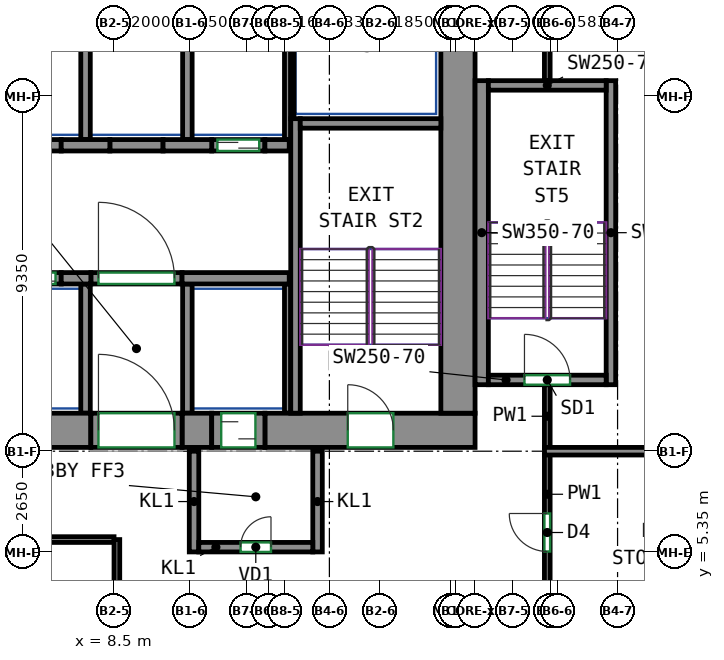
"""IFC4 building model, lengths in metres.
Left out: names, types, materials, properties, quantities, classifications, styles, units other than length and angle.
Written with IfcOpenShell. Run it as: python <this file> out.ifc"""

import sys

from ifc_helpers import new_model, si_unit, direction, frame, frame_2d, origin, place, context, subcontext, project, spatial, rectangle, extrude, source, transform, mapped, element, fill, save


model = new_model("IFC4")
c1 = context("Model", 3, precision=1e-05, world=origin(), true_north=direction((0.0, 1.0)))
c2 = subcontext(c1, "Body", "Model", "MODEL_VIEW")
j1 = project(units=[si_unit("LENGTHUNIT", "METRE"), si_unit("PLANEANGLEUNIT", "RADIAN")], contexts=[c1])
p1 = place(None, origin())
s1 = spatial("IfcSite", under=j1, at=p1, CompositionType="ELEMENT")
p2 = place(p1, origin())
s2 = spatial("IfcBuilding", under=s1, at=p2, CompositionType="ELEMENT")
p3 = place(p2, frame((0.0, 0.0, 147.3)))
s3 = spatial("IfcBuildingStorey", under=s2, at=p3, CompositionType="ELEMENT", Elevation=147.3)
m1 = source(origin(), c2, "Body", "SweptSolid", [
    extrude(rectangle(XDim=14.18, YDim=0.9, at=frame_2d((7.09, 0.0))), origin(), (0.0, 0.0, 1.0), 3.12),
])
p4 = place(p3, frame((-6.29, 8.55, 0.0), z_axis=(0.0, 0.0, 1.0), x_axis=(1.0, 0.0, 0.0)))
e1 = element("IfcWall", 1, at=p4, inside=s3, PredefinedType="SHEAR", context=c2, shape_type="MappedRepresentation", body=[
    mapped(m1, transform((0.0, 0.0, 0.0))),
])
m2 = source(origin(), c2, "Body", "SweptSolid", [
    extrude(rectangle(XDim=0.78, YDim=0.9, at=frame_2d((0.39, 0.0))), origin(), (0.0, 0.0, 1.0), 3.12),
])
p5 = place(p3, frame((10.29, 8.55, 0.0), z_axis=(0.0, 0.0, 1.0), x_axis=(1.0, 0.0, 0.0)))
e2 = element("IfcWall", 2, at=p5, inside=s3, PredefinedType="SHEAR", context=c2, shape_type="MappedRepresentation", body=[
    mapped(m2, transform((0.0, 0.0, 0.0))),
])
m3 = source(origin(), c2, "Body", "SweptSolid", [
    extrude(rectangle(XDim=5.53, YDim=0.9, at=frame_2d((2.765, 0.0))), origin(), (0.0, 0.0, 1.0), 3.12),
])
p6 = place(p3, frame((12.47, 8.55, 0.0), z_axis=(0.0, 0.0, 1.0), x_axis=(1.0, 0.0, 0.0)))
e3 = element("IfcWall", 3, at=p6, inside=s3, PredefinedType="SHEAR", context=c2, shape_type="MappedRepresentation", body=[
    mapped(m3, transform((0.0, 0.0, 0.0))),
])
p7 = place(p6, frame((2.18, 0.0, 0.0)))
e4 = element("IfcOpeningElement", 4, at=p7, cuts=e3, PredefinedType="OPENING", context=c2, shape_type="SweptSolid", body=[
    extrude(rectangle(XDim=1.2, YDim=2.1, at=frame_2d((0.6, 1.05))), frame((0.0, 0.46, 0.0), z_axis=(0.0, -1.0, 0.0), x_axis=(1.0, 0.0, 0.0)), (0.0, 0.0, 1.0), 0.92),
])
m4 = source(origin(), c2, "Body", "SweptSolid", [
    extrude(rectangle(XDim=12.0, YDim=0.9, at=frame_2d((6.0, 0.0))), origin(), (0.0, 0.0, 1.0), 3.12),
])
p8 = place(p3, frame((17.55, 9.0, 0.0), z_axis=(0.0, 0.0, 1.0), x_axis=(0.0, 1.0, 0.0)))
e5 = element("IfcWall", 5, at=p8, inside=s3, PredefinedType="SHEAR", context=c2, shape_type="MappedRepresentation", body=[
    mapped(m4, transform((0.0, 0.0, 0.0))),
])
m5 = source(origin(), c2, "Body", "SweptSolid", [
    extrude(rectangle(XDim=7.75, YDim=0.25, at=frame_2d((3.875, 0.0))), origin(), (0.0, 0.0, 1.0), 3.12),
])
p9 = place(p3, frame((13.275, 9.0, 0.0), z_axis=(0.0, 0.0, 1.0), x_axis=(0.0, 1.0, 0.0)))
e6 = element("IfcWall", 6, at=p9, inside=s3, PredefinedType="SHEAR", context=c2, shape_type="MappedRepresentation", body=[
    mapped(m5, transform((0.0, 0.0, 0.0))),
])
m6 = source(origin(), c2, "Body", "SweptSolid", [
    extrude(rectangle(XDim=3.7, YDim=0.25, at=frame_2d((1.85, 0.0))), origin(), (0.0, 0.0, 1.0), 3.12),
])
p10 = place(p3, frame((13.4, 16.625, 0.0), z_axis=(0.0, 0.0, 1.0), x_axis=(1.0, 0.0, 0.0)))
e7 = element("IfcWall", 7, at=p10, inside=s3, PredefinedType="SHEAR", context=c2, shape_type="MappedRepresentation", body=[
    mapped(m6, transform((0.0, 0.0, 0.0))),
])
m7 = source(origin(), c2, "Body", "SweptSolid", [
    extrude(rectangle(XDim=8.0, YDim=0.35, at=frame_2d((4.0, 0.0))), origin(), (0.0, 0.0, 1.0), 3.12),
])
p11 = place(p3, frame((18.175, 9.75, 0.0), z_axis=(0.0, 0.0, 1.0), x_axis=(0.0, 1.0, 0.0)))
e8 = element("IfcWall", 8, at=p11, inside=s3, PredefinedType="SHEAR", context=c2, shape_type="MappedRepresentation", body=[
    mapped(m7, transform((0.0, 0.0, 0.0))),
])
m8 = source(origin(), c2, "Body", "SweptSolid", [
    extrude(rectangle(XDim=8.0, YDim=0.25, at=frame_2d((4.0, 0.0))), origin(), (0.0, 0.0, 1.0), 3.12),
])
p12 = place(p3, frame((21.575, 9.75, 0.0), z_axis=(0.0, 0.0, 1.0), x_axis=(0.0, 1.0, 0.0)))
e9 = element("IfcWall", 9, at=p12, inside=s3, PredefinedType="SHEAR", context=c2, shape_type="MappedRepresentation", body=[
    mapped(m8, transform((0.0, 0.0, 0.0))),
])
m9 = source(origin(), c2, "Body", "SweptSolid", [
    extrude(rectangle(XDim=3.1, YDim=0.25, at=frame_2d((1.55, 0.0))), origin(), (0.0, 0.0, 1.0), 3.12),
])
p13 = place(p3, frame((18.35, 9.875, 0.0), z_axis=(0.0, 0.0, 1.0), x_axis=(1.0, 0.0, 0.0)))
e10 = element("IfcWall", 10, at=p13, inside=s3, PredefinedType="SHEAR", context=c2, shape_type="MappedRepresentation", body=[
    mapped(m9, transform((0.0, 0.0, 0.0))),
])
p14 = place(p13, frame((0.95, 0.0, 0.0)))
e11 = element("IfcOpeningElement", 11, at=p14, cuts=e10, PredefinedType="OPENING", context=c2, shape_type="SweptSolid", body=[
    extrude(rectangle(XDim=1.2, YDim=2.1, at=frame_2d((0.6, 1.05))), frame((0.0, 0.135, 0.0), z_axis=(0.0, -1.0, 0.0), x_axis=(1.0, 0.0, 0.0)), (0.0, 0.0, 1.0), 0.27),
])
p15 = place(p3, frame((18.35, 17.625, 0.0), z_axis=(0.0, 0.0, 1.0), x_axis=(1.0, 0.0, 0.0)))
e12 = element("IfcWall", 12, at=p15, inside=s3, PredefinedType="SHEAR", context=c2, shape_type="MappedRepresentation", body=[
    mapped(m9, transform((0.0, 0.0, 0.0))),
])
m10 = source(origin(), c2, "Body", "SweptSolid", [
    extrude(rectangle(XDim=0.78, YDim=0.3, at=frame_2d((0.39, 0.0))), origin(), (0.0, 0.0, 1.0), 3.12),
])
p16 = place(p3, frame((7.11, 12.55, 0.0), z_axis=(0.0, 0.0, 1.0), x_axis=(1.0, 0.0, 0.0)))
e13 = element("IfcWall", 13, at=p16, inside=s3, PredefinedType="SHEAR", context=c2, shape_type="MappedRepresentation", body=[
    mapped(m10, transform((0.0, 0.0, 0.0))),
])
m11 = source(origin(), c2, "Body", "SweptSolid", [
    extrude(rectangle(XDim=2.82, YDim=0.3, at=frame_2d((1.41, 0.0))), origin(), (0.0, 0.0, 1.0), 3.12),
])
p17 = place(p3, frame((10.29, 12.55, 0.0), z_axis=(0.0, 0.0, 1.0), x_axis=(1.0, 0.0, 0.0)))
e14 = element("IfcWall", 14, at=p17, inside=s3, PredefinedType="SHEAR", context=c2, shape_type="MappedRepresentation", body=[
    mapped(m11, transform((0.0, 0.0, 0.0))),
])
m12 = source(origin(), c2, "Body", "SweptSolid", [
    extrude(rectangle(XDim=1.28, YDim=0.3, at=frame_2d((0.64, 0.0))), origin(), (0.0, 0.0, 1.0), 3.12),
])
p18 = place(p3, frame((7.11, 16.05, 0.0), z_axis=(0.0, 0.0, 1.0), x_axis=(1.0, 0.0, 0.0)))
e15 = element("IfcWall", 15, at=p18, inside=s3, PredefinedType="SHEAR", context=c2, shape_type="MappedRepresentation", body=[
    mapped(m12, transform((0.0, 0.0, 0.0))),
])
m13 = source(origin(), c2, "Body", "SweptSolid", [
    extrude(rectangle(XDim=1.28, YDim=0.3, at=frame_2d((0.64, 0.0))), origin(), (0.0, 0.0, 1.0), 3.12),
])
p19 = place(p3, frame((9.79, 16.05, 0.0), z_axis=(0.0, 0.0, 1.0), x_axis=(1.0, 0.0, 0.0)))
e16 = element("IfcWall", 16, at=p19, inside=s3, PredefinedType="SHEAR", context=c2, shape_type="MappedRepresentation", body=[
    mapped(m13, transform((0.0, 0.0, 0.0))),
])
m14 = source(origin(), c2, "Body", "SweptSolid", [
    extrude(rectangle(XDim=0.64, YDim=0.3, at=frame_2d((0.32, 0.0))), origin(), (0.0, 0.0, 1.0), 3.12),
])
p20 = place(p3, frame((12.47, 16.05, 0.0), z_axis=(0.0, 0.0, 1.0), x_axis=(1.0, 0.0, 0.0)))
e17 = element("IfcWall", 17, at=p20, inside=s3, PredefinedType="SHEAR", context=c2, shape_type="MappedRepresentation", body=[
    mapped(m14, transform((0.0, 0.0, 0.0))),
])
m15 = source(origin(), c2, "Body", "SweptSolid", [
    extrude(rectangle(XDim=1.4, YDim=0.3, at=frame_2d((0.7, 0.0))), origin(), (0.0, 0.0, 1.0), 3.12),
])
p21 = place(p3, frame((5.71, 12.55, 0.0), z_axis=(0.0, 0.0, 1.0), x_axis=(1.0, 0.0, 0.0)))
e18 = element("IfcWall", 18, at=p21, inside=s3, PredefinedType="PARTITIONING", context=c2, shape_type="MappedRepresentation", body=[
    mapped(m15, transform((0.0, 0.0, 0.0))),
])
p22 = place(p21, frame((0.15, 0.0, 0.0)))
e19 = element("IfcOpeningElement", 19, at=p22, cuts=e18, PredefinedType="OPENING", context=c2, shape_type="SweptSolid", body=[
    extrude(rectangle(XDim=1.1, YDim=2.1, at=frame_2d((0.55, 1.05))), frame((0.0, 0.16, 0.0), z_axis=(0.0, -1.0, 0.0), x_axis=(1.0, 0.0, 0.0)), (0.0, 0.0, 1.0), 0.32),
])
m16 = source(origin(), c2, "Body", "SweptSolid", [
    extrude(rectangle(XDim=1.4, YDim=0.3, at=frame_2d((0.7, 0.0))), origin(), (0.0, 0.0, 1.0), 3.12),
])
p23 = place(p3, frame((11.07, 16.05, 0.0), z_axis=(0.0, 0.0, 1.0), x_axis=(1.0, 0.0, 0.0)))
e20 = element("IfcWall", 20, at=p23, inside=s3, PredefinedType="PARTITIONING", context=c2, shape_type="MappedRepresentation", body=[
    mapped(m16, transform((0.0, 0.0, 0.0))),
])
p24 = place(p23, frame((0.15, 0.0, 0.0)))
e21 = element("IfcOpeningElement", 21, at=p24, cuts=e20, PredefinedType="OPENING", context=c2, shape_type="SweptSolid", body=[
    extrude(rectangle(XDim=1.1, YDim=2.1, at=frame_2d((0.55, 1.05))), frame((0.0, 0.16, 0.0), z_axis=(0.0, -1.0, 0.0), x_axis=(1.0, 0.0, 0.0)), (0.0, 0.0, 1.0), 0.32),
])
m17 = source(origin(), c2, "Body", "SweptSolid", [
    extrude(rectangle(XDim=2.4, YDim=0.3, at=frame_2d((1.2, 0.0))), origin(), (0.0, 0.0, 1.0), 3.12),
])
p25 = place(p3, frame((7.89, 12.55, 0.0), z_axis=(0.0, 0.0, 1.0), x_axis=(1.0, 0.0, 0.0)))
e22 = element("IfcWall", 22, at=p25, inside=s3, PredefinedType="PARTITIONING", context=c2, shape_type="MappedRepresentation", body=[
    mapped(m17, transform((0.0, 0.0, 0.0))),
])
p26 = place(p25, frame((0.2, 0.0, 0.0)))
e23 = element("IfcOpeningElement", 23, at=p26, cuts=e22, PredefinedType="OPENING", context=c2, shape_type="SweptSolid", body=[
    extrude(rectangle(XDim=2.0, YDim=2.1, at=frame_2d((1.0, 1.05))), frame((0.0, 0.16, 0.0), z_axis=(0.0, -1.0, 0.0), x_axis=(1.0, 0.0, 0.0)), (0.0, 0.0, 1.0), 0.32),
])
for number, where, z_axis, x_axis in (
    (24, (5.71, 16.05, 0.0), (0.0, 0.0, 1.0), (1.0, 0.0, 0.0)),
    (25, (8.39, 16.05, 0.0), (0.0, 0.0, 1.0), (1.0, 0.0, 0.0)),
):
    element("IfcWall", number, at=place(p3, frame(where, z_axis=z_axis, x_axis=x_axis)), inside=s3, PredefinedType="PARTITIONING", context=c2, shape_type="MappedRepresentation", body=[
        mapped(m15, transform((0.0, 0.0, 0.0))),
    ])
m18 = source(origin(), c2, "Body", "SweptSolid", [
    extrude(rectangle(XDim=2.65, YDim=0.25, at=frame_2d((1.325, 0.0))), origin(), (0.0, 0.0, 1.0), 3.12),
])
for number, where, z_axis, x_axis in (
    (26, (10.605, 5.35, 0.0), (0.0, 0.0, 1.0), (0.0, 1.0, 0.0)),
    (27, (13.855, 5.35, 0.0), (0.0, 0.0, 1.0), (0.0, 1.0, 0.0)),
):
    element("IfcWall", number, at=place(p3, frame(where, z_axis=z_axis, x_axis=x_axis)), inside=s3, PredefinedType="PARTITIONING", context=c2, shape_type="MappedRepresentation", body=[
        mapped(m18, transform((0.0, 0.0, 0.0))),
    ])
m19 = source(origin(), c2, "Body", "SweptSolid", [
    extrude(rectangle(XDim=3.0, YDim=0.25, at=frame_2d((1.5, 0.0))), origin(), (0.0, 0.0, 1.0), 3.12),
])
p27 = place(p3, frame((10.73, 5.475, 0.0), z_axis=(0.0, 0.0, 1.0), x_axis=(1.0, 0.0, 0.0)))
e28 = element("IfcWall", 28, at=p27, inside=s3, PredefinedType="PARTITIONING", context=c2, shape_type="MappedRepresentation", body=[
    mapped(m19, transform((0.0, 0.0, 0.0))),
])
p28 = place(p27, frame((1.1, 0.0, 0.0)))
e29 = element("IfcOpeningElement", 29, at=p28, cuts=e28, PredefinedType="OPENING", context=c2, shape_type="SweptSolid", body=[
    extrude(rectangle(XDim=0.8, YDim=2.0, at=frame_2d((0.4, 1.0))), frame((0.0, 0.135, 0.0), z_axis=(0.0, -1.0, 0.0), x_axis=(1.0, 0.0, 0.0)), (0.0, 0.0, 1.0), 0.27),
])
m20 = source(origin(), c2, "Body", "SweptSolid", [
    extrude(rectangle(XDim=3.275, YDim=0.165, at=frame_2d((1.638, 0.0))), origin(), (0.0, 0.0, 1.0), 3.12),
])
p29 = place(p3, frame((13.067, 16.2, 0.0), z_axis=(0.0, 0.0, 1.0), x_axis=(0.0, 1.0, 0.0)))
e30 = element("IfcWall", 30, at=p29, inside=s3, PredefinedType="PARTITIONING", context=c2, shape_type="MappedRepresentation", body=[
    mapped(m20, transform((0.0, 0.0, 0.0))),
])
m21 = source(origin(), c2, "Body", "SweptSolid", [
    extrude(rectangle(XDim=3.275, YDim=0.25, at=frame_2d((1.638, 0.0))), origin(), (0.0, 0.0, 1.0), 3.12),
])
p30 = place(p3, frame((10.43, 16.2, 0.0), z_axis=(0.0, 0.0, 1.0), x_axis=(0.0, 1.0, 0.0)))
e31 = element("IfcWall", 31, at=p30, inside=s3, PredefinedType="PARTITIONING", context=c2, shape_type="MappedRepresentation", body=[
    mapped(m21, transform((0.0, 0.0, 0.0))),
])
m22 = source(origin(), c2, "Body", "SweptSolid", [
    extrude(rectangle(XDim=2.725, YDim=0.085, at=frame_2d((1.363, 0.0))), origin(), (0.0, 0.0, 1.0), 3.12),
])
p31 = place(p3, frame((13.192, 16.75, 0.0), z_axis=(0.0, 0.0, 1.0), x_axis=(0.0, 1.0, 0.0)))
e32 = element("IfcWall", 32, at=p31, inside=s3, PredefinedType="PARTITIONING", context=c2, shape_type="MappedRepresentation", body=[
    mapped(m22, transform((0.0, 0.0, 0.0))),
])
p32 = place(p3, frame((7.75, 16.2, 0.0), z_axis=(0.0, 0.0, 1.0), x_axis=(0.0, 1.0, 0.0)))
e33 = element("IfcWall", 33, at=p32, inside=s3, PredefinedType="PARTITIONING", context=c2, shape_type="MappedRepresentation", body=[
    mapped(m21, transform((0.0, 0.0, 0.0))),
])
m23 = source(origin(), c2, "Body", "SweptSolid", [
    extrude(rectangle(XDim=3.4, YDim=0.25, at=frame_2d((1.7, 0.0))), origin(), (0.0, 0.0, 1.0), 3.12),
])
p33 = place(p3, frame((10.43, 9.0, 0.0), z_axis=(0.0, 0.0, 1.0), x_axis=(0.0, 1.0, 0.0)))
e34 = element("IfcWall", 34, at=p33, inside=s3, PredefinedType="PARTITIONING", context=c2, shape_type="MappedRepresentation", body=[
    mapped(m23, transform((0.0, 0.0, 0.0))),
])
m24 = source(origin(), c2, "Body", "SweptSolid", [
    extrude(rectangle(XDim=3.4, YDim=0.165, at=frame_2d((1.7, 0.0))), origin(), (0.0, 0.0, 1.0), 3.12),
])
p34 = place(p3, frame((13.067, 9.0, 0.0), z_axis=(0.0, 0.0, 1.0), x_axis=(0.0, 1.0, 0.0)))
e35 = element("IfcWall", 35, at=p34, inside=s3, PredefinedType="PARTITIONING", context=c2, shape_type="MappedRepresentation", body=[
    mapped(m24, transform((0.0, 0.0, 0.0))),
])
p35 = place(p3, frame((7.75, 9.0, 0.0), z_axis=(0.0, 0.0, 1.0), x_axis=(0.0, 1.0, 0.0)))
e36 = element("IfcWall", 36, at=p35, inside=s3, PredefinedType="PARTITIONING", context=c2, shape_type="MappedRepresentation", body=[
    mapped(m23, transform((0.0, 0.0, 0.0))),
])
m25 = source(origin(), c2, "Body", "SweptSolid", [
    extrude(rectangle(XDim=2.4, YDim=0.9, at=frame_2d((1.2, 0.0))), origin(), (0.0, 0.0, 1.0), 2.7),
])
p36 = place(p3, frame((7.89, 8.55, 0.0), z_axis=(0.0, 0.0, 1.0), x_axis=(1.0, 0.0, 0.0)))
e37 = element("IfcWall", 37, at=p36, inside=s3, PredefinedType="PARTITIONING", context=c2, shape_type="MappedRepresentation", body=[
    mapped(m25, transform((0.0, 0.0, 0.0))),
])
p37 = place(p36, frame((0.2, 0.0, 0.0)))
e38 = element("IfcOpeningElement", 38, at=p37, cuts=e37, PredefinedType="OPENING", context=c2, shape_type="SweptSolid", body=[
    extrude(rectangle(XDim=2.0, YDim=2.1, at=frame_2d((1.0, 1.05))), frame((0.0, 0.46, 0.0), z_axis=(0.0, -1.0, 0.0), x_axis=(1.0, 0.0, 0.0)), (0.0, 0.0, 1.0), 0.92),
])
m26 = source(origin(), c2, "Body", "SweptSolid", [
    extrude(rectangle(XDim=1.4, YDim=0.9, at=frame_2d((0.7, 0.0))), origin(), (0.0, 0.0, 1.0), 2.7),
])
p38 = place(p3, frame((11.07, 8.55, 0.0), z_axis=(0.0, 0.0, 1.0), x_axis=(1.0, 0.0, 0.0)))
e39 = element("IfcWall", 39, at=p38, inside=s3, PredefinedType="PARTITIONING", context=c2, shape_type="MappedRepresentation", body=[
    mapped(m26, transform((0.0, 0.0, 0.0))),
])
p39 = place(p38, frame((0.25, 0.0, 0.0)))
e40 = element("IfcOpeningElement", 40, at=p39, cuts=e39, PredefinedType="OPENING", context=c2, shape_type="SweptSolid", body=[
    extrude(rectangle(XDim=0.9, YDim=2.1, at=frame_2d((0.45, 1.05))), frame((0.0, 0.46, 0.0), z_axis=(0.0, -1.0, 0.0), x_axis=(1.0, 0.0, 0.0)), (0.0, 0.0, 1.0), 0.92),
])
p40 = place(p3, frame((19.9, 4.434, 0.0), z_axis=(0.0, 0.0, 1.0), x_axis=(0.0, 1.0, 0.0)))
e41 = element("IfcWall", 41, at=p40, inside=s3, PredefinedType="PARTITIONING", context=c2, shape_type="SweptSolid", body=[
    extrude(rectangle(XDim=3.476, YDim=0.15, at=frame_2d((1.738, 0.0))), origin(), (0.0, 0.0, 1.0), 3.12),
])
p41 = place(p40, frame((0.927, 0.0, 0.0)))
e42 = element("IfcOpeningElement", 42, at=p41, cuts=e41, PredefinedType="OPENING", context=c2, shape_type="SweptSolid", body=[
    extrude(rectangle(XDim=1.0, YDim=2.1, at=frame_2d((0.5, 1.05))), frame((0.0, 0.085, 0.0), z_axis=(0.0, -1.0, 0.0), x_axis=(1.0, 0.0, 0.0)), (0.0, 0.0, 1.0), 0.17),
])
p42 = place(p3, frame((19.9, 17.75, 0.0), z_axis=(0.0, 0.0, 1.0), x_axis=(0.0, 1.0, 0.0)))
e43 = element("IfcWall", 43, at=p42, inside=s3, PredefinedType="PARTITIONING", context=c2, shape_type="SweptSolid", body=[
    extrude(rectangle(XDim=4.175, YDim=0.15, at=frame_2d((2.087, 0.0))), origin(), (0.0, 0.0, 1.0), 3.12),
])
p43 = place(p42, frame((1.227, 0.0, 0.0)))
e44 = element("IfcOpeningElement", 44, at=p43, cuts=e43, PredefinedType="OPENING", context=c2, shape_type="SweptSolid", body=[
    extrude(rectangle(XDim=0.9, YDim=2.1, at=frame_2d((0.45, 1.05))), frame((0.0, 0.085, 0.0), z_axis=(0.0, -1.0, 0.0), x_axis=(1.0, 0.0, 0.0)), (0.0, 0.0, 1.0), 0.17),
])
p44 = place(p3, frame((19.9, 8.09, 0.0), z_axis=(0.0, 0.0, 1.0), x_axis=(0.0, 1.0, 0.0)))
e45 = element("IfcWall", 45, at=p44, inside=s3, PredefinedType="PARTITIONING", context=c2, shape_type="SweptSolid", body=[
    extrude(rectangle(XDim=1.66, YDim=0.15, at=frame_2d((0.83, 0.0))), origin(), (0.0, 0.0, 1.0), 3.12),
])
p45 = place(p3, frame((19.827, 8.0, 0.0), z_axis=(0.0, 0.0, 1.0), x_axis=(1.0, 0.0, 0.0)))
e46 = element("IfcWall", 46, at=p45, inside=s3, PredefinedType="PARTITIONING", context=c2, shape_type="SweptSolid", body=[
    extrude(rectangle(XDim=4.573, YDim=0.2, at=frame_2d((2.287, 0.0))), origin(), (0.0, 0.0, 1.0), 3.12),
])
p46 = place(p3, frame((-6.575, 5.675, 0.0), z_axis=(0.0, 0.0, 1.0), x_axis=(1.0, 0.0, 0.0)))
e47 = element("IfcWall", 47, at=p46, inside=s3, PredefinedType="PARTITIONING", context=c2, shape_type="SweptSolid", body=[
    extrude(rectangle(XDim=15.075, YDim=0.15, at=frame_2d((7.538, 0.0))), origin(), (0.0, 0.0, 1.0), 3.12),
])
p47 = place(p3, frame((8.575, 5.675, 0.0), z_axis=(0.0, 0.0, 1.0), x_axis=(0.0, -1.0, 0.0)))
e48 = element("IfcWall", 48, at=p47, inside=s3, PredefinedType="PARTITIONING", context=c2, shape_type="SweptSolid", body=[
    extrude(rectangle(XDim=15.15, YDim=0.15, at=frame_2d((7.575, 0.0))), origin(), (0.0, 0.0, 1.0), 3.12),
])
p48 = place(p26, origin())
e49 = element("IfcDoor", 49, at=p48, inside=s3, OperationType="DOUBLE_DOOR_SINGLE_SWING", PredefinedType="DOOR", context=c2, shape_type="SweptSolid", body=[
    extrude(rectangle(XDim=2.0, YDim=2.1, at=frame_2d((1.0, 1.05))), frame((0.0, 0.025, 0.0), z_axis=(0.0, -1.0, 0.0), x_axis=(1.0, 0.0, 0.0)), (0.0, 0.0, 1.0), 0.05),
])
fill(e23, e49)
p49 = place(p37, origin())
e50 = element("IfcDoor", 50, at=p49, inside=s3, OperationType="DOUBLE_DOOR_SINGLE_SWING", PredefinedType="DOOR", context=c2, shape_type="SweptSolid", body=[
    extrude(rectangle(XDim=2.0, YDim=2.1, at=frame_2d((1.0, 1.05))), frame((0.0, 0.355, 0.0), z_axis=(0.0, -1.0, 0.0), x_axis=(1.0, 0.0, 0.0)), (0.0, 0.0, 1.0), 0.05),
])
fill(e38, e50)
p50 = place(p28, origin())
e51 = element("IfcDoor", 51, at=p50, inside=s3, OperationType="SINGLE_SWING_RIGHT", PredefinedType="DOOR", context=c2, shape_type="SweptSolid", body=[
    extrude(rectangle(XDim=0.8, YDim=2.0, at=frame_2d((0.4, 1.0))), frame((0.0, 0.025, 0.0), z_axis=(0.0, -1.0, 0.0), x_axis=(1.0, 0.0, 0.0)), (0.0, 0.0, 1.0), 0.05),
])
fill(e29, e51)
p51 = place(p39, origin())
e52 = element("IfcDoor", 52, at=p51, inside=s3, OperationType="SLIDING_TO_LEFT", PredefinedType="DOOR", context=c2, shape_type="SweptSolid", body=[
    extrude(rectangle(XDim=0.9, YDim=2.1, at=frame_2d((0.45, 1.05))), frame((0.0, 0.355, 0.0), z_axis=(0.0, -1.0, 0.0), x_axis=(1.0, 0.0, 0.0)), (0.0, 0.0, 1.0), 0.05),
])
fill(e40, e52)
p52 = place(p22, origin())
e53 = element("IfcDoor", 53, at=p52, inside=s3, OperationType="DOUBLE_DOOR_SLIDING", PredefinedType="DOOR", context=c2, shape_type="SweptSolid", body=[
    extrude(rectangle(XDim=1.1, YDim=2.1, at=frame_2d((0.55, 1.05))), frame((0.0, 0.025, 0.0), z_axis=(0.0, -1.0, 0.0), x_axis=(1.0, 0.0, 0.0)), (0.0, 0.0, 1.0), 0.05),
])
fill(e19, e53)
p53 = place(p24, origin())
e54 = element("IfcDoor", 54, at=p53, inside=s3, OperationType="DOUBLE_DOOR_SLIDING", PredefinedType="DOOR", context=c2, shape_type="SweptSolid", body=[
    extrude(rectangle(XDim=1.1, YDim=2.1, at=frame_2d((0.55, 1.05))), frame((0.0, 0.025, 0.0), z_axis=(0.0, -1.0, 0.0), x_axis=(1.0, 0.0, 0.0)), (0.0, 0.0, 1.0), 0.05),
])
fill(e21, e54)
p54 = place(p7, origin())
e55 = element("IfcDoor", 55, at=p54, inside=s3, OperationType="DOUBLE_DOOR_SINGLE_SWING", PredefinedType="DOOR", context=c2, shape_type="SweptSolid", body=[
    extrude(rectangle(XDim=1.2, YDim=2.1, at=frame_2d((0.6, 1.05))), frame((0.0, 0.355, 0.0), z_axis=(0.0, -1.0, 0.0), x_axis=(1.0, 0.0, 0.0)), (0.0, 0.0, 1.0), 0.05),
])
fill(e4, e55)
p55 = place(p14, origin())
e56 = element("IfcDoor", 56, at=p55, inside=s3, OperationType="DOUBLE_DOOR_SINGLE_SWING", PredefinedType="DOOR", context=c2, shape_type="SweptSolid", body=[
    extrude(rectangle(XDim=1.2, YDim=2.1, at=frame_2d((0.6, 1.05))), frame((0.0, 0.025, 0.0), z_axis=(0.0, -1.0, 0.0), x_axis=(1.0, 0.0, 0.0)), (0.0, 0.0, 1.0), 0.05),
])
fill(e11, e56)
p56 = place(p41, origin())
e57 = element("IfcDoor", 57, at=p56, inside=s3, OperationType="SINGLE_SWING_RIGHT", PredefinedType="DOOR", context=c2, shape_type="SweptSolid", body=[
    extrude(rectangle(XDim=1.0, YDim=2.1, at=frame_2d((0.5, 1.05))), frame((0.0, 0.025, 0.0), z_axis=(0.0, -1.0, 0.0), x_axis=(1.0, 0.0, 0.0)), (0.0, 0.0, 1.0), 0.05),
])
fill(e42, e57)
save(model, sys.argv[1])
